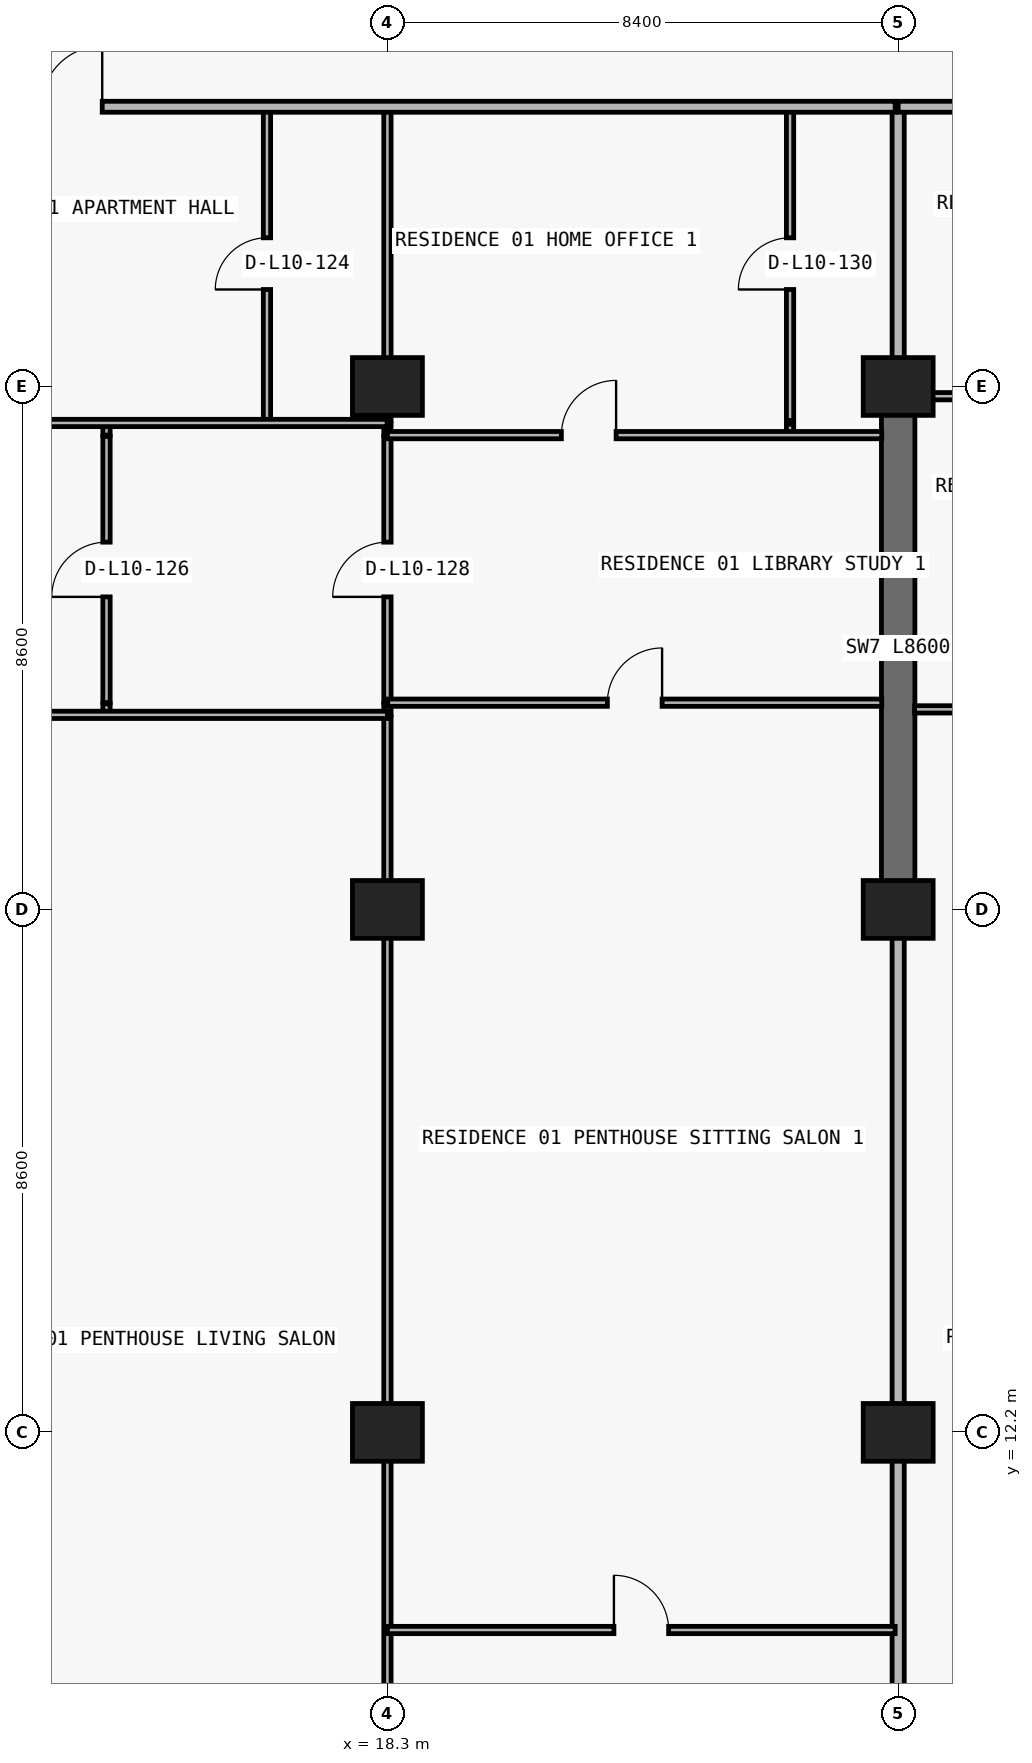
"""IFC4 building model, lengths in metres.
Left out: names, types, materials, properties, quantities, classifications, styles, units other than length and angle.
Written with IfcOpenShell. Run it as: python <this file> out.ifc"""

import sys

from ifc_helpers import new_model, si_unit, direction, frame, frame_2d, origin, origin_2d, place, context, subcontext, project, spatial, rectangle, extrude, element, fill, save


model = new_model("IFC4")
c1 = context("Model", 3, precision=1e-05, world=origin(), true_north=direction((0.0, 1.0)))
c2 = subcontext(c1, "Body", "Model", "MODEL_VIEW")
j1 = project(units=[si_unit("LENGTHUNIT", "METRE"), si_unit("PLANEANGLEUNIT", "RADIAN")], contexts=[c1])
p1 = place(None, origin())
s1 = spatial("IfcSite", under=j1, at=p1, CompositionType="ELEMENT")
p2 = place(p1, origin())
s2 = spatial("IfcBuilding", under=s1, at=p2, CompositionType="ELEMENT")
p3 = place(p2, frame((0.0, 0.0, 43.2)))
s3 = spatial("IfcBuildingStorey", under=s2, at=p3, CompositionType="ELEMENT", Elevation=43.2)
for number, where, z_axis, x_axis in (
    (1, (18.3, 12.2, 0.0), (0.0, 0.0, 1.0), (1.0, 0.0, 0.0)),
    (2, (26.7, 12.2, 0.0), (0.0, 0.0, 1.0), (1.0, 0.0, 0.0)),
    (3, (18.3, 20.8, 0.0), (0.0, 0.0, 1.0), (1.0, 0.0, 0.0)),
    (4, (26.7, 20.8, 0.0), (0.0, 0.0, 1.0), (1.0, 0.0, 0.0)),
    (5, (18.3, 29.4, 0.0), (0.0, 0.0, 1.0), (1.0, 0.0, 0.0)),
    (6, (26.7, 29.4, 0.0), (0.0, 0.0, 1.0), (1.0, 0.0, 0.0)),
):
    element("IfcColumn", number, at=place(p3, frame(where, z_axis=z_axis, x_axis=x_axis)), inside=s3, PredefinedType="COLUMN", context=c2, shape_type="SweptSolid", body=[
        extrude(rectangle(XDim=1.15, YDim=0.95, at=origin_2d()), origin(), (0.0, 0.0, 1.0), 3.05),
    ])
p4 = place(p3, frame((26.7, 20.8, 0.0), z_axis=(0.0, 0.0, 1.0), x_axis=(0.0, 1.0, 0.0)))
e7 = element("IfcWall", 7, at=p4, inside=s3, PredefinedType="SHEAR", context=c2, shape_type="SweptSolid", body=[
    extrude(rectangle(XDim=8.6, YDim=0.55, at=frame_2d((4.3, 0.0))), origin(), (0.0, 0.0, 1.0), 3.05),
])
p5 = place(p3, frame((13.68, 24.0, 0.0), z_axis=(0.0, 0.0, 1.0), x_axis=(0.0, 1.0, 0.0)))
e8 = element("IfcWall", 8, at=p5, inside=s3, PredefinedType="PARTITIONING", context=c2, shape_type="SweptSolid", body=[
    extrude(rectangle(XDim=0.18, YDim=0.12, at=frame_2d((0.09, 0.0))), origin(), (0.0, 0.0, 1.0), 3.05),
])
p6 = place(p3, frame((13.68, 24.2, 0.0), z_axis=(0.0, 0.0, 1.0), x_axis=(0.0, 1.0, 0.0)))
e9 = element("IfcWall", 9, at=p6, inside=s3, PredefinedType="PARTITIONING", context=c2, shape_type="SweptSolid", body=[
    extrude(rectangle(XDim=4.38, YDim=0.12, at=frame_2d((2.19, 0.0))), origin(), (0.0, 0.0, 1.0), 3.05),
])
p7 = place(p6, frame((1.74, 0.0, 0.0)))
e10 = element("IfcOpeningElement", 10, at=p7, cuts=e9, PredefinedType="OPENING", context=c2, shape_type="SweptSolid", body=[
    extrude(rectangle(XDim=0.9, YDim=2.15, at=frame_2d((0.45, 1.075))), frame((0.0, 0.07, 0.0), z_axis=(0.0, -1.0, 0.0), x_axis=(1.0, 0.0, 0.0)), (0.0, 0.0, 1.0), 0.14),
])
p8 = place(p3, frame((13.68, 28.6, 0.0), z_axis=(0.0, 0.0, 1.0), x_axis=(0.0, 1.0, 0.0)))
e11 = element("IfcWall", 11, at=p8, inside=s3, PredefinedType="PARTITIONING", context=c2, shape_type="SweptSolid", body=[
    extrude(rectangle(XDim=0.18, YDim=0.12, at=frame_2d((0.09, 0.0))), origin(), (0.0, 0.0, 1.0), 3.05),
])
p9 = place(p3, frame((16.319, 28.84, 0.0), z_axis=(0.0, 0.0, 1.0), x_axis=(0.0, 1.0, 0.0)))
e12 = element("IfcWall", 12, at=p9, inside=s3, PredefinedType="PARTITIONING", context=c2, shape_type="SweptSolid", body=[
    extrude(rectangle(XDim=5.16, YDim=0.12, at=frame_2d((2.58, 0.0))), origin(), (0.0, 0.0, 1.0), 3.05),
])
p10 = place(p9, frame((2.155, 0.0, 0.0)))
e13 = element("IfcOpeningElement", 13, at=p10, cuts=e12, PredefinedType="OPENING", context=c2, shape_type="SweptSolid", body=[
    extrude(rectangle(XDim=0.85, YDim=2.1, at=frame_2d((0.425, 1.05))), frame((0.0, 0.07, 0.0), z_axis=(0.0, -1.0, 0.0), x_axis=(1.0, 0.0, 0.0)), (0.0, 0.0, 1.0), 0.14),
])
p11 = place(p3, frame((18.3, 6.24, 0.0), z_axis=(0.0, 0.0, 1.0), x_axis=(0.0, 1.0, 0.0)))
e14 = element("IfcWall", 14, at=p11, inside=s3, PredefinedType="PARTITIONING", context=c2, shape_type="SweptSolid", body=[
    extrude(rectangle(XDim=17.73, YDim=0.12, at=frame_2d((8.865, 0.0))), origin(), (0.0, 0.0, 1.0), 2.11),
])
p12 = place(p3, frame((18.3, 24.0, 0.0), z_axis=(0.0, 0.0, 1.0), x_axis=(0.0, 1.0, 0.0)))
e15 = element("IfcWall", 15, at=p12, inside=s3, PredefinedType="PARTITIONING", context=c2, shape_type="SweptSolid", body=[
    extrude(rectangle(XDim=0.18, YDim=0.12, at=frame_2d((0.09, 0.0))), origin(), (0.0, 0.0, 1.0), 2.11),
])
p13 = place(p3, frame((18.3, 24.2, 0.0), z_axis=(0.0, 0.0, 1.0), x_axis=(0.0, 1.0, 0.0)))
e16 = element("IfcWall", 16, at=p13, inside=s3, PredefinedType="PARTITIONING", context=c2, shape_type="SweptSolid", body=[
    extrude(rectangle(XDim=4.38, YDim=0.12, at=frame_2d((2.19, 0.0))), origin(), (0.0, 0.0, 1.0), 2.11),
])
p14 = place(p13, frame((1.74, 0.0, 0.0)))
e17 = element("IfcOpeningElement", 17, at=p14, cuts=e16, PredefinedType="OPENING", context=c2, shape_type="SweptSolid", body=[
    extrude(rectangle(XDim=0.9, YDim=2.06, at=frame_2d((0.45, 1.03))), frame((0.0, 0.07, 0.0), z_axis=(0.0, -1.0, 0.0), x_axis=(1.0, 0.0, 0.0)), (0.0, 0.0, 1.0), 0.14),
])
p15 = place(p3, frame((18.3, 28.6, 0.0), z_axis=(0.0, 0.0, 1.0), x_axis=(0.0, 1.0, 0.0)))
e18 = element("IfcWall", 18, at=p15, inside=s3, PredefinedType="PARTITIONING", context=c2, shape_type="SweptSolid", body=[
    extrude(rectangle(XDim=0.18, YDim=0.12, at=frame_2d((0.09, 0.0))), origin(), (0.0, 0.0, 1.0), 2.11),
])
p16 = place(p3, frame((18.3, 28.84, 0.0), z_axis=(0.0, 0.0, 1.0), x_axis=(0.0, 1.0, 0.0)))
e19 = element("IfcWall", 19, at=p16, inside=s3, PredefinedType="PARTITIONING", context=c2, shape_type="SweptSolid", body=[
    extrude(rectangle(XDim=5.16, YDim=0.12, at=frame_2d((2.58, 0.0))), origin(), (0.0, 0.0, 1.0), 2.11),
])
p17 = place(p3, frame((24.922, 28.6, 0.0), z_axis=(0.0, 0.0, 1.0), x_axis=(0.0, 1.0, 0.0)))
e20 = element("IfcWall", 20, at=p17, inside=s3, PredefinedType="PARTITIONING", context=c2, shape_type="SweptSolid", body=[
    extrude(rectangle(XDim=0.18, YDim=0.12, at=frame_2d((0.09, 0.0))), origin(), (0.0, 0.0, 1.0), 3.05),
])
p18 = place(p3, frame((24.922, 28.84, 0.0), z_axis=(0.0, 0.0, 1.0), x_axis=(0.0, 1.0, 0.0)))
e21 = element("IfcWall", 21, at=p18, inside=s3, PredefinedType="PARTITIONING", context=c2, shape_type="SweptSolid", body=[
    extrude(rectangle(XDim=5.16, YDim=0.12, at=frame_2d((2.58, 0.0))), origin(), (0.0, 0.0, 1.0), 3.05),
])
p19 = place(p18, frame((2.155, 0.0, 0.0)))
e22 = element("IfcOpeningElement", 22, at=p19, cuts=e21, PredefinedType="OPENING", context=c2, shape_type="SweptSolid", body=[
    extrude(rectangle(XDim=0.85, YDim=2.1, at=frame_2d((0.425, 1.05))), frame((0.0, 0.07, 0.0), z_axis=(0.0, -1.0, 0.0), x_axis=(1.0, 0.0, 0.0)), (0.0, 0.0, 1.0), 0.14),
])
p20 = place(p3, frame((26.7, 6.24, 0.0), z_axis=(0.0, 0.0, 1.0), x_axis=(0.0, 1.0, 0.0)))
e23 = element("IfcWall", 23, at=p20, inside=s3, PredefinedType="PARTITIONING", context=c2, shape_type="SweptSolid", body=[
    extrude(rectangle(XDim=14.555, YDim=0.2, at=frame_2d((7.277, 0.0))), origin(), (0.0, 0.0, 1.0), 2.11),
])
p21 = place(p3, frame((26.7, 29.405, 0.0), z_axis=(0.0, 0.0, 1.0), x_axis=(0.0, 1.0, 0.0)))
e24 = element("IfcWall", 24, at=p21, inside=s3, PredefinedType="PARTITIONING", context=c2, shape_type="SweptSolid", body=[
    extrude(rectangle(XDim=4.595, YDim=0.2, at=frame_2d((2.297, 0.0))), origin(), (0.0, 0.0, 1.0), 2.335),
])
p22 = place(p3, frame((18.3, 8.95, 0.0), z_axis=(0.0, 0.0, 1.0), x_axis=(1.0, 0.0, 0.0)))
e25 = element("IfcWall", 25, at=p22, inside=s3, PredefinedType="PARTITIONING", context=c2, shape_type="SweptSolid", body=[
    extrude(rectangle(XDim=8.35, YDim=0.12, at=frame_2d((4.175, 0.0))), origin(), (0.0, 0.0, 1.0), 3.05),
])
p23 = place(p22, frame((3.725, 0.0, 0.0)))
e26 = element("IfcOpeningElement", 26, at=p23, cuts=e25, PredefinedType="OPENING", context=c2, shape_type="SweptSolid", body=[
    extrude(rectangle(XDim=0.9, YDim=2.15, at=frame_2d((0.45, 1.075))), frame((0.0, 0.07, 0.0), z_axis=(0.0, -1.0, 0.0), x_axis=(1.0, 0.0, 0.0)), (0.0, 0.0, 1.0), 0.14),
])
p24 = place(p3, frame((9.9, 24.0, 0.0), z_axis=(0.0, 0.0, 1.0), x_axis=(1.0, 0.0, 0.0)))
e27 = element("IfcWall", 27, at=p24, inside=s3, PredefinedType="PARTITIONING", context=c2, shape_type="SweptSolid", body=[
    extrude(rectangle(XDim=8.4, YDim=0.12, at=frame_2d((4.2, 0.0))), origin(), (0.0, 0.0, 1.0), 3.05),
])
p25 = place(p24, frame((1.44, 0.0, 0.0)))
e28 = element("IfcOpeningElement", 28, at=p25, cuts=e27, PredefinedType="OPENING", context=c2, shape_type="SweptSolid", body=[
    extrude(rectangle(XDim=0.9, YDim=2.15, at=frame_2d((0.45, 1.075))), frame((0.0, 0.07, 0.0), z_axis=(0.0, -1.0, 0.0), x_axis=(1.0, 0.0, 0.0)), (0.0, 0.0, 1.0), 0.14),
])
p26 = place(p3, frame((26.97, 24.09, 0.0), z_axis=(0.0, 0.0, 1.0), x_axis=(1.0, 0.0, 0.0)))
e29 = element("IfcWall", 29, at=p26, inside=s3, PredefinedType="PARTITIONING", context=c2, shape_type="SweptSolid", body=[
    extrude(rectangle(XDim=4.35, YDim=0.12, at=frame_2d((2.175, 0.0))), origin(), (0.0, 0.0, 1.0), 3.05),
])
p27 = place(p26, frame((1.558, 0.0, 0.0)))
e30 = element("IfcOpeningElement", 30, at=p27, cuts=e29, PredefinedType="OPENING", context=c2, shape_type="SweptSolid", body=[
    extrude(rectangle(XDim=0.9, YDim=2.15, at=frame_2d((0.45, 1.075))), frame((0.0, 0.07, 0.0), z_axis=(0.0, -1.0, 0.0), x_axis=(1.0, 0.0, 0.0)), (0.0, 0.0, 1.0), 0.14),
])
p28 = place(p3, frame((18.305, 24.2, 0.0), z_axis=(0.0, 0.0, 1.0), x_axis=(1.0, 0.0, 0.0)))
e31 = element("IfcWall", 31, at=p28, inside=s3, PredefinedType="PARTITIONING", context=c2, shape_type="SweptSolid", body=[
    extrude(rectangle(XDim=8.125, YDim=0.12, at=frame_2d((4.062, 0.0))), origin(), (0.0, 0.0, 1.0), 3.05),
])
p29 = place(p28, frame((3.613, 0.0, 0.0)))
e32 = element("IfcOpeningElement", 32, at=p29, cuts=e31, PredefinedType="OPENING", context=c2, shape_type="SweptSolid", body=[
    extrude(rectangle(XDim=0.9, YDim=2.15, at=frame_2d((0.45, 1.075))), frame((0.0, 0.07, 0.0), z_axis=(0.0, -1.0, 0.0), x_axis=(1.0, 0.0, 0.0)), (0.0, 0.0, 1.0), 0.14),
])
p30 = place(p3, frame((18.3, 28.6, 0.0), z_axis=(0.0, 0.0, 1.0), x_axis=(1.0, 0.0, 0.0)))
e33 = element("IfcWall", 33, at=p30, inside=s3, PredefinedType="PARTITIONING", context=c2, shape_type="SweptSolid", body=[
    extrude(rectangle(XDim=8.13, YDim=0.12, at=frame_2d((4.065, 0.0))), origin(), (0.0, 0.0, 1.0), 3.05),
])
p31 = place(p30, frame((2.861, 0.0, 0.0)))
e34 = element("IfcOpeningElement", 34, at=p31, cuts=e33, PredefinedType="OPENING", context=c2, shape_type="SweptSolid", body=[
    extrude(rectangle(XDim=0.9, YDim=2.15, at=frame_2d((0.45, 1.075))), frame((0.0, 0.07, 0.0), z_axis=(0.0, -1.0, 0.0), x_axis=(1.0, 0.0, 0.0)), (0.0, 0.0, 1.0), 0.14),
])
p32 = place(p3, frame((9.9, 28.8, 0.0), z_axis=(0.0, 0.0, 1.0), x_axis=(1.0, 0.0, 0.0)))
e35 = element("IfcWall", 35, at=p32, inside=s3, PredefinedType="PARTITIONING", context=c2, shape_type="SweptSolid", body=[
    extrude(rectangle(XDim=8.395, YDim=0.12, at=frame_2d((4.198, 0.0))), origin(), (0.0, 0.0, 1.0), 3.05),
])
p33 = place(p32, frame((1.44, 0.0, 0.0)))
e36 = element("IfcOpeningElement", 36, at=p33, cuts=e35, PredefinedType="OPENING", context=c2, shape_type="SweptSolid", body=[
    extrude(rectangle(XDim=0.9, YDim=2.15, at=frame_2d((0.45, 1.075))), frame((0.0, 0.07, 0.0), z_axis=(0.0, -1.0, 0.0), x_axis=(1.0, 0.0, 0.0)), (0.0, 0.0, 1.0), 0.14),
])
p34 = place(p3, frame((26.97, 29.24, 0.0), z_axis=(0.0, 0.0, 1.0), x_axis=(1.0, 0.0, 0.0)))
e37 = element("IfcWall", 37, at=p34, inside=s3, PredefinedType="PARTITIONING", context=c2, shape_type="SweptSolid", body=[
    extrude(rectangle(XDim=4.35, YDim=0.12, at=frame_2d((2.175, 0.0))), origin(), (0.0, 0.0, 1.0), 2.11),
])
p35 = place(p34, frame((1.558, 0.0, 0.0)))
e38 = element("IfcOpeningElement", 38, at=p35, cuts=e37, PredefinedType="OPENING", context=c2, shape_type="SweptSolid", body=[
    extrude(rectangle(XDim=0.9, YDim=2.06, at=frame_2d((0.45, 1.03))), frame((0.0, 0.07, 0.0), z_axis=(0.0, -1.0, 0.0), x_axis=(1.0, 0.0, 0.0)), (0.0, 0.0, 1.0), 0.14),
])
p36 = place(p3, frame((5.105, 34.0, 0.0), z_axis=(0.0, 0.0, 1.0), x_axis=(1.0, 0.0, 0.0)))
e39 = element("IfcWall", 39, at=p36, inside=s3, PredefinedType="PARTITIONING", context=c2, shape_type="SweptSolid", body=[
    extrude(rectangle(XDim=21.545, YDim=0.18, at=frame_2d((10.772, 0.0))), origin(), (0.0, 0.0, 1.0), 3.05),
])
p37 = place(p36, frame((7.504, 0.0, 0.0)))
e40 = element("IfcOpeningElement", 40, at=p37, cuts=e39, PredefinedType="OPENING", context=c2, shape_type="SweptSolid", body=[
    extrude(rectangle(XDim=1.0, YDim=2.2, at=frame_2d((0.5, 1.1))), frame((0.0, 0.1, 0.0), z_axis=(0.0, -1.0, 0.0), x_axis=(1.0, 0.0, 0.0)), (0.0, 0.0, 1.0), 0.2),
])
p38 = place(p3, frame((26.7, 34.0, 0.0), z_axis=(0.0, 0.0, 1.0), x_axis=(1.0, 0.0, 0.0)))
e41 = element("IfcWall", 41, at=p38, inside=s3, PredefinedType="PARTITIONING", context=c2, shape_type="SweptSolid", body=[
    extrude(rectangle(XDim=4.62, YDim=0.18, at=frame_2d((2.31, 0.0))), origin(), (0.0, 0.0, 1.0), 3.05),
])
p39 = place(p38, frame((1.81, 0.0, 0.0)))
e42 = element("IfcOpeningElement", 42, at=p39, cuts=e41, PredefinedType="OPENING", context=c2, shape_type="SweptSolid", body=[
    extrude(rectangle(XDim=1.0, YDim=2.2, at=frame_2d((0.5, 1.1))), frame((0.0, 0.1, 0.0), z_axis=(0.0, -1.0, 0.0), x_axis=(1.0, 0.0, 0.0)), (0.0, 0.0, 1.0), 0.2),
])
p40 = place(p37, origin())
e43 = element("IfcDoor", 43, at=p40, inside=s3, OperationType="SINGLE_SWING_RIGHT", PredefinedType="DOOR", context=c2, shape_type="SweptSolid", body=[
    extrude(rectangle(XDim=1.0, YDim=2.2, at=frame_2d((0.5, 1.1))), frame((0.0, 0.025, 0.0), z_axis=(0.0, -1.0, 0.0), x_axis=(1.0, 0.0, 0.0)), (0.0, 0.0, 1.0), 0.05),
])
fill(e40, e43)
p41 = place(p10, origin())
e44 = element("IfcDoor", 44, at=p41, inside=s3, OperationType="SINGLE_SWING_LEFT", PredefinedType="DOOR", context=c2, shape_type="SweptSolid", body=[
    extrude(rectangle(XDim=0.85, YDim=2.1, at=frame_2d((0.425, 1.05))), frame((0.0, 0.025, 0.0), z_axis=(0.0, -1.0, 0.0), x_axis=(1.0, 0.0, 0.0)), (0.0, 0.0, 1.0), 0.05),
])
fill(e13, e44)
p42 = place(p7, origin())
e45 = element("IfcDoor", 45, at=p42, inside=s3, OperationType="SINGLE_SWING_LEFT", PredefinedType="DOOR", context=c2, shape_type="SweptSolid", body=[
    extrude(rectangle(XDim=0.9, YDim=2.15, at=frame_2d((0.45, 1.075))), frame((0.0, 0.025, 0.0), z_axis=(0.0, -1.0, 0.0), x_axis=(1.0, 0.0, 0.0)), (0.0, 0.0, 1.0), 0.05),
])
fill(e10, e45)
p43 = place(p14, origin())
e46 = element("IfcDoor", 46, at=p43, inside=s3, OperationType="SINGLE_SWING_LEFT", PredefinedType="DOOR", context=c2, shape_type="SweptSolid", body=[
    extrude(rectangle(XDim=0.9, YDim=2.06, at=frame_2d((0.45, 1.03))), frame((0.0, 0.025, 0.0), z_axis=(0.0, -1.0, 0.0), x_axis=(1.0, 0.0, 0.0)), (0.0, 0.0, 1.0), 0.05),
])
fill(e17, e46)
p44 = place(p31, origin())
e47 = element("IfcDoor", 47, at=p44, inside=s3, OperationType="SINGLE_SWING_RIGHT", PredefinedType="DOOR", context=c2, shape_type="SweptSolid", body=[
    extrude(rectangle(XDim=0.9, YDim=2.15, at=frame_2d((0.45, 1.075))), frame((0.0, 0.025, 0.0), z_axis=(0.0, -1.0, 0.0), x_axis=(1.0, 0.0, 0.0)), (0.0, 0.0, 1.0), 0.05),
])
fill(e34, e47)
p45 = place(p19, origin())
e48 = element("IfcDoor", 48, at=p45, inside=s3, OperationType="SINGLE_SWING_LEFT", PredefinedType="DOOR", context=c2, shape_type="SweptSolid", body=[
    extrude(rectangle(XDim=0.85, YDim=2.1, at=frame_2d((0.425, 1.05))), frame((0.0, 0.025, 0.0), z_axis=(0.0, -1.0, 0.0), x_axis=(1.0, 0.0, 0.0)), (0.0, 0.0, 1.0), 0.05),
])
fill(e22, e48)
p46 = place(p29, origin())
e49 = element("IfcDoor", 49, at=p46, inside=s3, OperationType="SINGLE_SWING_RIGHT", PredefinedType="DOOR", context=c2, shape_type="SweptSolid", body=[
    extrude(rectangle(XDim=0.9, YDim=2.15, at=frame_2d((0.45, 1.075))), frame((0.0, 0.025, 0.0), z_axis=(0.0, -1.0, 0.0), x_axis=(1.0, 0.0, 0.0)), (0.0, 0.0, 1.0), 0.05),
])
fill(e32, e49)
p47 = place(p23, origin())
e50 = element("IfcDoor", 50, at=p47, inside=s3, OperationType="SINGLE_SWING_LEFT", PredefinedType="DOOR", context=c2, shape_type="SweptSolid", body=[
    extrude(rectangle(XDim=0.9, YDim=2.15, at=frame_2d((0.45, 1.075))), frame((0.0, 0.025, 0.0), z_axis=(0.0, -1.0, 0.0), x_axis=(1.0, 0.0, 0.0)), (0.0, 0.0, 1.0), 0.05),
])
fill(e26, e50)
save(model, sys.argv[1])
